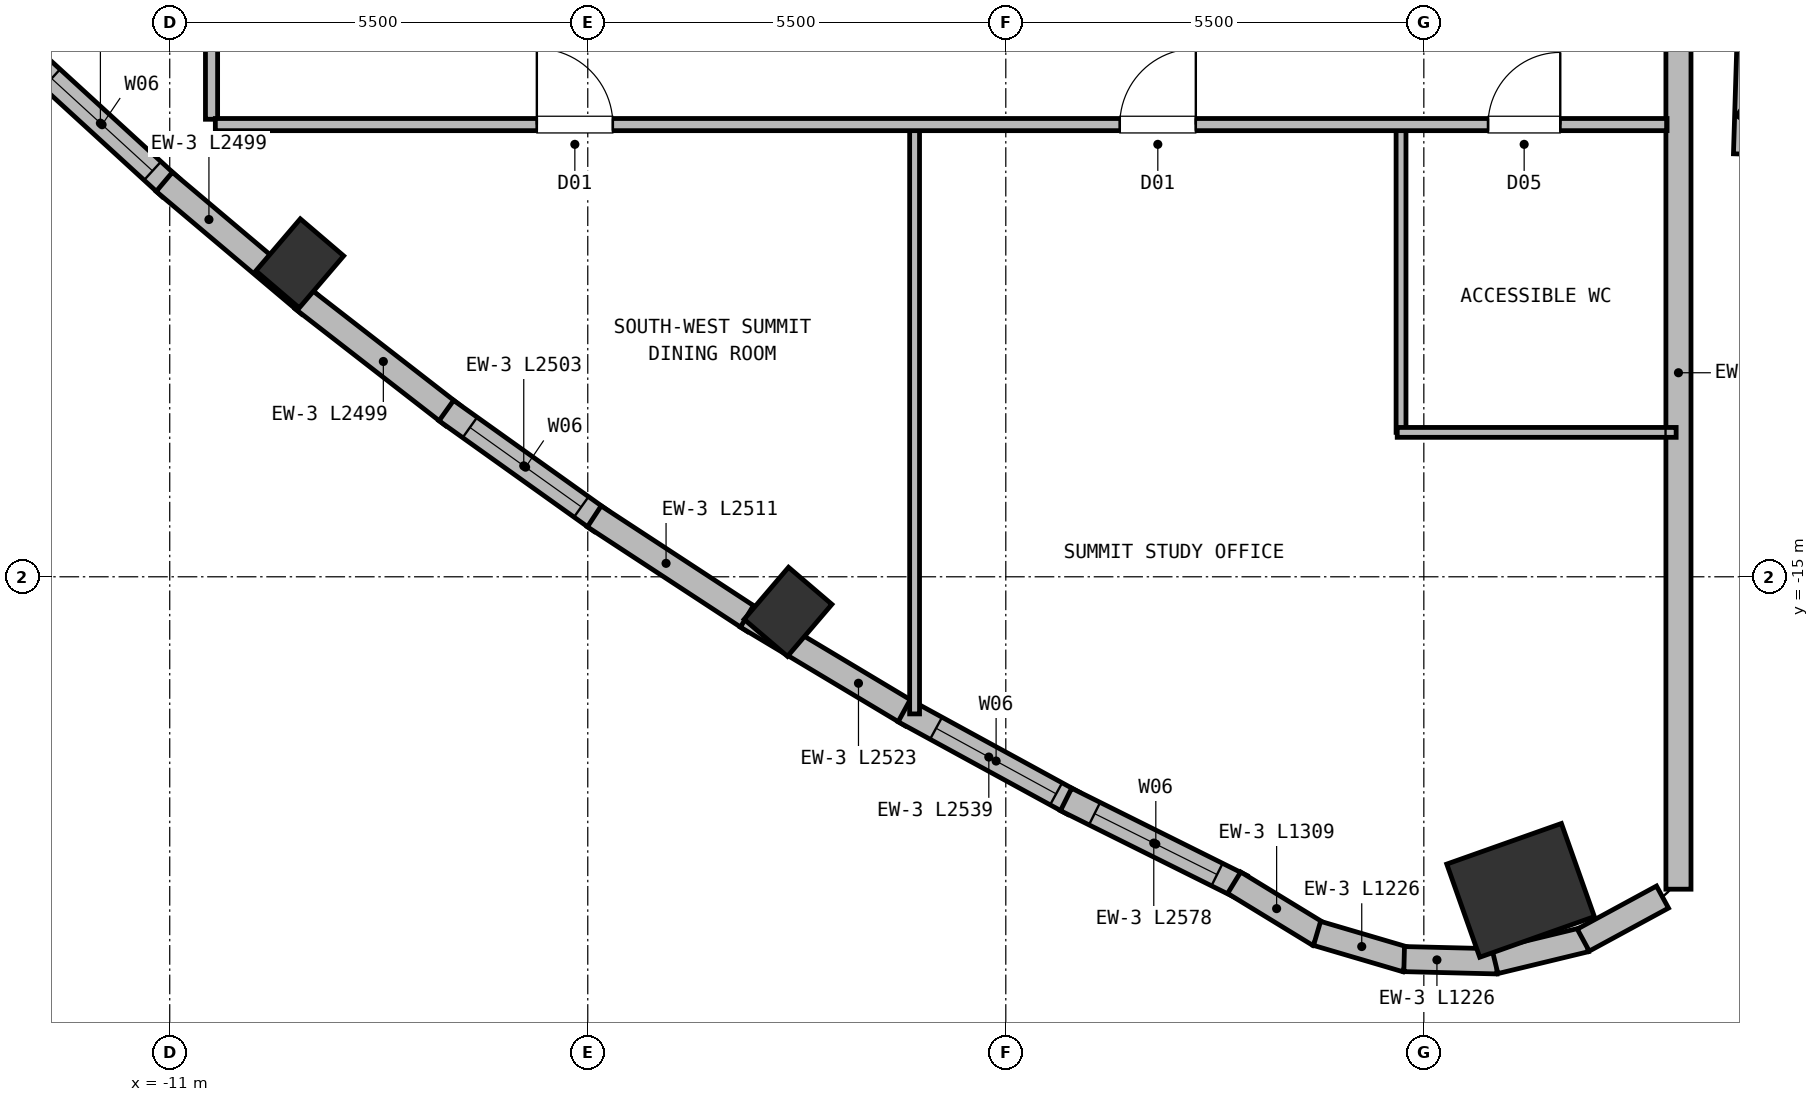
"""IFC4 building model, lengths in metres.
Left out: names, types, materials, properties, quantities, classifications, styles, units other than length and angle.
Written with IfcOpenShell. Run it as: python <this file> out.ifc"""

import sys

from ifc_helpers import new_model, si_unit, direction, frame, frame_2d, origin, origin_2d, place, context, subcontext, project, spatial, rectangle, extrude, element, fill, save


model = new_model("IFC4")
c1 = context("Model", 3, precision=1e-05, world=origin(), true_north=direction((0.0, 1.0)))
c2 = subcontext(c1, "Body", "Model", "MODEL_VIEW")
j1 = project(units=[si_unit("LENGTHUNIT", "METRE"), si_unit("PLANEANGLEUNIT", "RADIAN")], contexts=[c1])
p1 = place(None, origin())
s1 = spatial("IfcSite", under=j1, at=p1, CompositionType="ELEMENT")
p2 = place(p1, origin())
s2 = spatial("IfcBuilding", under=s1, at=p2, CompositionType="ELEMENT")
p3 = place(p2, frame((0.0, 0.0, 290.4)))
s3 = spatial("IfcBuildingStorey", under=s2, at=p3, CompositionType="ELEMENT", Elevation=290.4)
for number, where, z_axis, x_axis in (
    (1, (-9.289, -10.876, 0.0), (0.0, 0.0, 1.0), (-0.76, 0.649, 0.0)),
    (2, (-2.865, -15.461, 0.0), (0.0, 0.0, 1.0), (-0.76, 0.649, 0.0)),
):
    element("IfcColumn", number, at=place(p3, frame(where, z_axis=z_axis, x_axis=x_axis)), inside=s3, PredefinedType="COLUMN", context=c2, shape_type="SweptSolid", body=[
        extrude(rectangle(XDim=0.75, YDim=0.9, at=origin_2d()), origin(), (0.0, 0.0, 1.0), 4.4),
    ])
p4 = place(p3, frame((6.773, -19.126, 0.0), z_axis=(0.0, 0.0, 1.0), x_axis=(-0.333806859234, 0.942641491092, 0.0)))
e3 = element("IfcColumn", 3, at=p4, inside=s3, PredefinedType="COLUMN", context=c2, shape_type="SweptSolid", body=[
    extrude(rectangle(XDim=1.3, YDim=1.6, at=origin_2d()), origin(), (0.0, 0.0, 1.0), 4.4),
])
p5 = place(p3, frame((8.85, -5.52, 0.0), z_axis=(0.0, 0.0, 1.0), x_axis=(0.0, -1.0, 0.0)))
e4 = element("IfcWall", 4, at=p5, inside=s3, PredefinedType="SOLIDWALL", context=c2, shape_type="SweptSolid", body=[
    extrude(rectangle(XDim=13.591, YDim=0.33, at=frame_2d((6.795, 0.0))), origin(), (0.0, 0.0, 1.0), 4.13),
])
p6 = place(p3, frame((9.739, -9.439, 0.0), z_axis=(0.0, 0.0, 1.0), x_axis=(0.031147484759, 0.999514799387, 0.0)))
e5 = element("IfcWall", 5, at=p6, inside=s3, PredefinedType="SOLIDWALL", context=c2, shape_type="SweptSolid", body=[
    extrude(rectangle(XDim=6.114, YDim=0.33, at=frame_2d((3.057, 0.0))), origin(), (0.0, 0.0, 1.0), 3.65),
])
p7 = place(p3, frame((-10.989, -9.876, 0.0), z_axis=(0.0, 0.0, 1.0), x_axis=(-0.737627628948, 0.675207731748, 0.0)))
e6 = element("IfcWall", 6, at=p7, inside=s3, PredefinedType="SOLIDWALL", context=c2, shape_type="SweptSolid", body=[
    extrude(rectangle(XDim=2.503, YDim=0.33, at=frame_2d((1.251, 0.0))), origin(), (0.0, 0.0, 1.0), 4.13),
])
p8 = place(p7, frame((0.322, 0.0, 0.72)))
e7 = element("IfcOpeningElement", 7, at=p8, cuts=e6, PredefinedType="OPENING", context=c2, shape_type="SweptSolid", body=[
    extrude(rectangle(XDim=1.8, YDim=2.25, at=frame_2d((0.9, 1.125))), frame((0.0, 0.175, 0.0), z_axis=(0.0, -1.0, 0.0), x_axis=(1.0, 0.0, 0.0)), (0.0, 0.0, 1.0), 0.35),
])
p9 = place(p3, frame((-9.161, -11.415, 0.0), z_axis=(0.0, 0.0, 1.0), x_axis=(-0.764315556833, 0.644842406781, 0.0)))
e8 = element("IfcWall", 8, at=p9, inside=s3, PredefinedType="SOLIDWALL", context=c2, shape_type="SweptSolid", body=[
    extrude(rectangle(XDim=2.499, YDim=0.33, at=frame_2d((1.25, 0.0))), origin(), (0.0, 0.0, 1.0), 4.13),
])
p10 = place(p3, frame((-7.273, -12.879, 0.0), z_axis=(0.0, 0.0, 1.0), x_axis=(-0.789841179094, 0.613311431336, 0.0)))
e9 = element("IfcWall", 9, at=p10, inside=s3, PredefinedType="SOLIDWALL", context=c2, shape_type="SweptSolid", body=[
    extrude(rectangle(XDim=2.499, YDim=0.33, at=frame_2d((1.25, 0.0))), origin(), (0.0, 0.0, 1.0), 4.13),
])
p11 = place(p3, frame((-5.323, -14.267, 0.0), z_axis=(0.0, 0.0, 1.0), x_axis=(-0.814029925436, 0.580822933857, 0.0)))
e10 = element("IfcWall", 10, at=p11, inside=s3, PredefinedType="SOLIDWALL", context=c2, shape_type="SweptSolid", body=[
    extrude(rectangle(XDim=2.503, YDim=0.33, at=frame_2d((1.251, 0.0))), origin(), (0.0, 0.0, 1.0), 4.13),
])
p12 = place(p11, frame((0.322, 0.0, 0.72)))
e11 = element("IfcOpeningElement", 11, at=p12, cuts=e10, PredefinedType="OPENING", context=c2, shape_type="SweptSolid", body=[
    extrude(rectangle(XDim=1.8, YDim=2.25, at=frame_2d((0.9, 1.125))), frame((0.0, 0.175, 0.0), z_axis=(0.0, -1.0, 0.0), x_axis=(1.0, 0.0, 0.0)), (0.0, 0.0, 1.0), 0.35),
])
p13 = place(p3, frame((-3.313, -15.58, 0.0), z_axis=(0.0, 0.0, 1.0), x_axis=(-0.836746876737, 0.547589868671, 0.0)))
e12 = element("IfcWall", 12, at=p13, inside=s3, PredefinedType="SOLIDWALL", context=c2, shape_type="SweptSolid", body=[
    extrude(rectangle(XDim=2.511, YDim=0.33, at=frame_2d((1.255, 0.0))), origin(), (0.0, 0.0, 1.0), 4.13),
])
p14 = place(p3, frame((-1.242, -16.818, 0.0), z_axis=(0.0, 0.0, 1.0), x_axis=(-0.857902474262, 0.513812557899, 0.0)))
e13 = element("IfcWall", 13, at=p14, inside=s3, PredefinedType="SOLIDWALL", context=c2, shape_type="SweptSolid", body=[
    extrude(rectangle(XDim=2.523, YDim=0.33, at=frame_2d((1.262, 0.0))), origin(), (0.0, 0.0, 1.0), 4.13),
])
p15 = place(p3, frame((0.89, -17.98, 0.0), z_axis=(0.0, 0.0, 1.0), x_axis=(-0.877542510611, 0.479498844702, 0.0)))
e14 = element("IfcWall", 14, at=p15, inside=s3, PredefinedType="SOLIDWALL", context=c2, shape_type="SweptSolid", body=[
    extrude(rectangle(XDim=2.539, YDim=0.33, at=frame_2d((1.269, 0.0))), origin(), (0.0, 0.0, 1.0), 4.13),
])
p16 = place(p15, frame((0.26, 0.0, 0.72)))
e15 = element("IfcOpeningElement", 15, at=p16, cuts=e14, PredefinedType="OPENING", context=c2, shape_type="SweptSolid", body=[
    extrude(rectangle(XDim=1.8, YDim=2.25, at=frame_2d((0.9, 1.125))), frame((0.0, 0.175, 0.0), z_axis=(0.0, -1.0, 0.0), x_axis=(1.0, 0.0, 0.0)), (0.0, 0.0, 1.0), 0.35),
])
p17 = place(p3, frame((3.101, -19.078, 0.0), z_axis=(0.0, 0.0, 1.0), x_axis=(-0.895277941462, 0.445508033073, 0.0)))
e16 = element("IfcWall", 16, at=p17, inside=s3, PredefinedType="SOLIDWALL", context=c2, shape_type="SweptSolid", body=[
    extrude(rectangle(XDim=2.578, YDim=0.33, at=frame_2d((1.289, 0.0))), origin(), (0.0, 0.0, 1.0), 4.13),
])
p18 = place(p17, frame((0.359, 0.0, 0.72)))
e17 = element("IfcOpeningElement", 17, at=p18, cuts=e16, PredefinedType="OPENING", context=c2, shape_type="SweptSolid", body=[
    extrude(rectangle(XDim=1.8, YDim=2.25, at=frame_2d((0.9, 1.125))), frame((0.0, 0.175, 0.0), z_axis=(0.0, -1.0, 0.0), x_axis=(1.0, 0.0, 0.0)), (0.0, 0.0, 1.0), 0.35),
])
p19 = place(p3, frame((4.122, -19.708, 0.0), z_axis=(0.0, 0.0, 1.0), x_axis=(-0.853318707867, 0.521389665034, 0.0)))
e18 = element("IfcWall", 18, at=p19, inside=s3, PredefinedType="SOLIDWALL", context=c2, shape_type="SweptSolid", body=[
    extrude(rectangle(XDim=1.309, YDim=0.33, at=frame_2d((0.655, 0.0))), origin(), (0.0, 0.0, 1.0), 4.13),
])
for number, where, z_axis, x_axis in (
    (19, (5.271, -20.038, 0.0), (0.0, 0.0, 1.0), (-0.959, 0.283, 0.0)),
    (20, (6.467, -20.061, 0.0), (0.0, 0.0, 1.0), (-1.0, 0.025, 0.0)),
):
    element("IfcWall", number, at=place(p3, frame(where, z_axis=z_axis, x_axis=x_axis)), inside=s3, PredefinedType="SOLIDWALL", context=c2, shape_type="SweptSolid", body=[
        extrude(rectangle(XDim=1.226, YDim=0.33, at=frame_2d((0.613, 0.0))), origin(), (0.0, 0.0, 1.0), 4.13),
    ])
p20 = place(p3, frame((7.627, -19.772, 0.0), z_axis=(0.0, 0.0, 1.0), x_axis=(-0.97199913572, -0.234984425353, 0.0)))
e21 = element("IfcWall", 21, at=p20, inside=s3, PredefinedType="SOLIDWALL", context=c2, shape_type="SweptSolid", body=[
    extrude(rectangle(XDim=1.226, YDim=0.33, at=frame_2d((0.613, 0.0))), origin(), (0.0, 0.0, 1.0), 4.13),
])
p21 = place(p3, frame((8.64, -19.214, 0.0), z_axis=(0.0, 0.0, 1.0), x_axis=(-0.878860825238, -0.477078242914, 0.0)))
e22 = element("IfcWall", 22, at=p21, inside=s3, PredefinedType="SOLIDWALL", context=c2, shape_type="SweptSolid", body=[
    extrude(rectangle(XDim=1.187, YDim=0.33, at=frame_2d((0.593, 0.0))), origin(), (0.0, 0.0, 1.0), 4.13),
])
p22 = place(p3, frame((12.352, -10.593, 0.0), z_axis=(0.0, 0.0, 1.0), x_axis=(-0.82687387766, 0.562387402459, 0.0)))
e23 = element("IfcWall", 23, at=p22, inside=s3, PredefinedType="SOLIDWALL", context=c2, shape_type="SweptSolid", body=[
    extrude(rectangle(XDim=3.193, YDim=0.33, at=frame_2d((1.596, 0.0))), origin(), (0.0, 0.0, 1.0), 3.65),
])
p23 = place(p3, frame((-1.2, -9.0, 0.0), z_axis=(0.0, 0.0, 1.0), x_axis=(0.0, -1.0, 0.0)))
e24 = element("IfcWall", 24, at=p23, inside=s3, PredefinedType="PARTITIONING", context=c2, shape_type="SweptSolid", body=[
    extrude(rectangle(XDim=7.804, YDim=0.13, at=frame_2d((3.902, 0.0))), origin(), (0.0, 0.0, 1.0), 3.71),
])
p24 = place(p3, frame((5.2, -9.0, 0.0), z_axis=(0.0, 0.0, 1.0), x_axis=(0.0, -1.0, 0.0)))
e25 = element("IfcWall", 25, at=p24, inside=s3, PredefinedType="PARTITIONING", context=c2, shape_type="SweptSolid", body=[
    extrude(rectangle(XDim=4.1, YDim=0.13, at=frame_2d((2.05, 0.0))), origin(), (0.0, 0.0, 1.0), 4.13),
])
p25 = place(p3, frame((5.15, -13.1, 0.0), z_axis=(0.0, 0.0, 1.0), x_axis=(1.0, 0.0, 0.0)))
e26 = element("IfcWall", 26, at=p25, inside=s3, PredefinedType="PARTITIONING", context=c2, shape_type="SweptSolid", body=[
    extrude(rectangle(XDim=3.67, YDim=0.13, at=frame_2d((1.835, 0.0))), origin(), (0.0, 0.0, 1.0), 4.13),
])
p26 = place(p3, frame((-10.45, 1.1, 0.0), z_axis=(0.0, 0.0, 1.0), x_axis=(0.0, -1.0, 0.0)))
e27 = element("IfcWall", 27, at=p26, inside=s3, PredefinedType="PARTITIONING", context=c2, shape_type="SweptSolid", body=[
    extrude(rectangle(XDim=10.08, YDim=0.16, at=frame_2d((5.04, 0.0))), origin(), (0.0, 0.0, 1.0), 4.13),
])
p27 = place(p26, frame((6.06, 0.0, 0.0)))
e28 = element("IfcOpeningElement", 28, at=p27, cuts=e27, PredefinedType="OPENING", context=c2, shape_type="SweptSolid", body=[
    extrude(rectangle(XDim=1.0, YDim=2.15, at=frame_2d((0.5, 1.075))), frame((0.0, 0.09, 0.0), z_axis=(0.0, -1.0, 0.0), x_axis=(1.0, 0.0, 0.0)), (0.0, 0.0, 1.0), 0.18),
])
p28 = place(p3, frame((-10.4, -9.05, 0.0), z_axis=(0.0, 0.0, 1.0), x_axis=(1.0, 0.0, 0.0)))
e29 = element("IfcWall", 29, at=p28, inside=s3, PredefinedType="PARTITIONING", context=c2, shape_type="SweptSolid", body=[
    extrude(rectangle(XDim=19.1, YDim=0.16, at=frame_2d((9.55, 0.0))), origin(), (0.0, 0.0, 1.0), 4.13),
])
p29 = place(p28, frame((4.23, 0.0, 0.0)))
e30 = element("IfcOpeningElement", 30, at=p29, cuts=e29, PredefinedType="OPENING", context=c2, shape_type="SweptSolid", body=[
    extrude(rectangle(XDim=1.0, YDim=2.15, at=frame_2d((0.5, 1.075))), frame((0.0, 0.09, 0.0), z_axis=(0.0, -1.0, 0.0), x_axis=(1.0, 0.0, 0.0)), (0.0, 0.0, 1.0), 0.18),
])
p30 = place(p28, frame((11.9, 0.0, 0.0)))
e31 = element("IfcOpeningElement", 31, at=p30, cuts=e29, PredefinedType="OPENING", context=c2, shape_type="SweptSolid", body=[
    extrude(rectangle(XDim=1.0, YDim=2.15, at=frame_2d((0.5, 1.075))), frame((0.0, 0.09, 0.0), z_axis=(0.0, -1.0, 0.0), x_axis=(1.0, 0.0, 0.0)), (0.0, 0.0, 1.0), 0.18),
])
p31 = place(p28, frame((16.745, 0.0, 0.0)))
e32 = element("IfcOpeningElement", 32, at=p31, cuts=e29, PredefinedType="OPENING", context=c2, shape_type="SweptSolid", body=[
    extrude(rectangle(XDim=0.95, YDim=2.1, at=frame_2d((0.475, 1.05))), frame((0.0, 0.09, 0.0), z_axis=(0.0, -1.0, 0.0), x_axis=(1.0, 0.0, 0.0)), (0.0, 0.0, 1.0), 0.18),
])
p32 = place(p8, origin())
e33 = element("IfcWindow", 33, at=p32, inside=s3, PartitioningType="SINGLE_PANEL", PredefinedType="WINDOW", context=c2, shape_type="SweptSolid", body=[
    extrude(rectangle(XDim=1.8, YDim=2.25, at=frame_2d((0.9, 1.125))), frame((0.0, 0.03, 0.0), z_axis=(0.0, -1.0, 0.0), x_axis=(1.0, 0.0, 0.0)), (0.0, 0.0, 1.0), 0.06),
])
fill(e7, e33)
p33 = place(p12, origin())
e34 = element("IfcWindow", 34, at=p33, inside=s3, PartitioningType="SINGLE_PANEL", PredefinedType="WINDOW", context=c2, shape_type="SweptSolid", body=[
    extrude(rectangle(XDim=1.8, YDim=2.25, at=frame_2d((0.9, 1.125))), frame((0.0, 0.03, 0.0), z_axis=(0.0, -1.0, 0.0), x_axis=(1.0, 0.0, 0.0)), (0.0, 0.0, 1.0), 0.06),
])
fill(e11, e34)
p34 = place(p16, origin())
e35 = element("IfcWindow", 35, at=p34, inside=s3, PartitioningType="SINGLE_PANEL", PredefinedType="WINDOW", context=c2, shape_type="SweptSolid", body=[
    extrude(rectangle(XDim=1.8, YDim=2.25, at=frame_2d((0.9, 1.125))), frame((0.0, 0.03, 0.0), z_axis=(0.0, -1.0, 0.0), x_axis=(1.0, 0.0, 0.0)), (0.0, 0.0, 1.0), 0.06),
])
fill(e15, e35)
p35 = place(p18, origin())
e36 = element("IfcWindow", 36, at=p35, inside=s3, PartitioningType="SINGLE_PANEL", PredefinedType="WINDOW", context=c2, shape_type="SweptSolid", body=[
    extrude(rectangle(XDim=1.8, YDim=2.25, at=frame_2d((0.9, 1.125))), frame((0.0, 0.03, 0.0), z_axis=(0.0, -1.0, 0.0), x_axis=(1.0, 0.0, 0.0)), (0.0, 0.0, 1.0), 0.06),
])
fill(e17, e36)
p36 = place(p29, origin())
e37 = element("IfcDoor", 37, at=p36, inside=s3, OperationType="SINGLE_SWING_LEFT", PredefinedType="DOOR", context=c2, shape_type="SweptSolid", body=[
    extrude(rectangle(XDim=1.0, YDim=2.15, at=frame_2d((0.5, 1.075))), frame((0.0, 0.025, 0.0), z_axis=(0.0, -1.0, 0.0), x_axis=(1.0, 0.0, 0.0)), (0.0, 0.0, 1.0), 0.05),
])
fill(e30, e37)
p37 = place(p30, origin())
e38 = element("IfcDoor", 38, at=p37, inside=s3, OperationType="SINGLE_SWING_RIGHT", PredefinedType="DOOR", context=c2, shape_type="SweptSolid", body=[
    extrude(rectangle(XDim=1.0, YDim=2.15, at=frame_2d((0.5, 1.075))), frame((0.0, 0.025, 0.0), z_axis=(0.0, -1.0, 0.0), x_axis=(1.0, 0.0, 0.0)), (0.0, 0.0, 1.0), 0.05),
])
fill(e31, e38)
p38 = place(p31, origin())
e39 = element("IfcDoor", 39, at=p38, inside=s3, OperationType="SINGLE_SWING_RIGHT", PredefinedType="DOOR", context=c2, shape_type="SweptSolid", body=[
    extrude(rectangle(XDim=0.95, YDim=2.1, at=frame_2d((0.475, 1.05))), frame((0.0, 0.025, 0.0), z_axis=(0.0, -1.0, 0.0), x_axis=(1.0, 0.0, 0.0)), (0.0, 0.0, 1.0), 0.05),
])
fill(e32, e39)
save(model, sys.argv[1])
